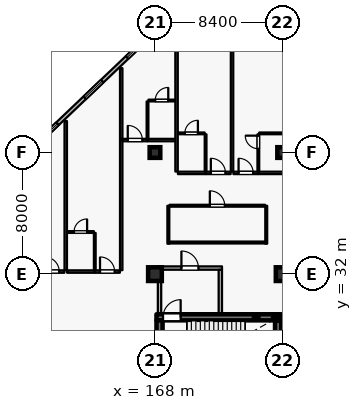
"""IFC4 building model, lengths in metres.
Left out: names, types, materials, properties, quantities, classifications, styles, units other than length and angle.
Written with IfcOpenShell. Run it as: python <this file> out.ifc"""

import sys

from ifc_helpers import new_model, si_unit, direction, frame, frame_2d, origin, origin_2d, place, context, subcontext, project, spatial, rectangle, hollow_rectangle, extrude, element, fill, save


model = new_model("IFC4")
c1 = context("Model", 3, precision=1e-05, world=origin(), true_north=direction((0.0, 1.0)))
c2 = subcontext(c1, "Body", "Model", "MODEL_VIEW")
j1 = project(units=[si_unit("LENGTHUNIT", "METRE"), si_unit("PLANEANGLEUNIT", "RADIAN")], contexts=[c1])
p1 = place(None, origin())
s1 = spatial("IfcSite", under=j1, at=p1, CompositionType="ELEMENT")
p2 = place(p1, origin())
s2 = spatial("IfcBuilding", under=s1, at=p2, CompositionType="ELEMENT")
p3 = place(p2, frame((0.0, 0.0, 11.4)))
s3 = spatial("IfcBuildingStorey", under=s2, at=p3, CompositionType="ELEMENT", Elevation=11.4)
for number, where, z_axis, x_axis in (
    (1, (168.0, 32.0, 0.0), (0.0, 0.0, 1.0), (1.0, 0.0, 0.0)),
    (2, (176.4, 32.0, 0.0), (0.0, 0.0, 1.0), (1.0, 0.0, 0.0)),
):
    element("IfcColumn", number, at=place(p3, frame(where, z_axis=z_axis, x_axis=x_axis)), inside=s3, PredefinedType="COLUMN", context=c2, shape_type="SweptSolid", body=[
        extrude(rectangle(XDim=0.9, YDim=0.9, at=origin_2d()), origin(), (0.0, 0.0, 1.0), 4.8),
    ])
for number, where, z_axis, x_axis in (
    (3, (168.0, 40.0, 0.0), (0.0, 0.0, 1.0), (1.0, 0.0, 0.0)),
    (4, (176.4, 40.0, 0.0), (0.0, 0.0, 1.0), (1.0, 0.0, 0.0)),
):
    element("IfcColumn", number, at=place(p3, frame(where, z_axis=z_axis, x_axis=x_axis)), inside=s3, PredefinedType="COLUMN", context=c2, shape_type="SweptSolid", body=[
        extrude(rectangle(XDim=0.7, YDim=0.7, at=origin_2d()), origin(), (0.0, 0.0, 1.0), 4.8),
    ])
p4 = place(p3, frame((160.0, 40.381, 0.0), z_axis=(0.0, 0.0, 1.0), x_axis=(0.724156739794, 0.689635422677, 0.0)))
e5 = element("IfcWall", 5, at=p4, inside=s3, PredefinedType="SOLIDWALL", context=c2, shape_type="SweptSolid", body=[
    extrude(rectangle(XDim=10.495, YDim=0.24, at=frame_2d((5.248, 0.0))), origin(), (0.0, 0.0, 1.0), 4.13),
])
p5 = place(p4, frame((0.602, 0.0, 0.8)))
e6 = element("IfcOpeningElement", 6, at=p5, cuts=e5, PredefinedType="OPENING", context=c2, shape_type="SweptSolid", body=[
    extrude(rectangle(XDim=1.6, YDim=1.6, at=frame_2d((0.8, 0.8))), frame((0.0, 0.13, 0.0), z_axis=(0.0, -1.0, 0.0), x_axis=(1.0, 0.0, 0.0)), (0.0, 0.0, 1.0), 0.26),
])
p6 = place(p4, frame((4.662, 0.0, 0.8)))
e7 = element("IfcOpeningElement", 7, at=p6, cuts=e5, PredefinedType="OPENING", context=c2, shape_type="SweptSolid", body=[
    extrude(rectangle(XDim=1.6, YDim=1.6, at=frame_2d((0.8, 0.8))), frame((0.0, 0.13, 0.0), z_axis=(0.0, -1.0, 0.0), x_axis=(1.0, 0.0, 0.0)), (0.0, 0.0, 1.0), 0.26),
])
p7 = place(p4, frame((8.508, 0.0, 0.8)))
e8 = element("IfcOpeningElement", 8, at=p7, cuts=e5, PredefinedType="OPENING", context=c2, shape_type="SweptSolid", body=[
    extrude(rectangle(XDim=1.6, YDim=1.6, at=frame_2d((0.8, 0.8))), frame((0.0, 0.13, 0.0), z_axis=(0.0, -1.0, 0.0), x_axis=(1.0, 0.0, 0.0)), (0.0, 0.0, 1.0), 0.26),
])
p8 = place(p3, frame((176.1, 25.005, 0.0), z_axis=(0.0, 0.0, 1.0), x_axis=(0.0, 1.0, 0.0)))
e9 = element("IfcWall", 9, at=p8, inside=s3, PredefinedType="SHEAR", context=c2, shape_type="SweptSolid", body=[
    extrude(rectangle(XDim=3.95, YDim=0.4, at=frame_2d((1.975, 0.0))), origin(), (0.0, 0.0, 1.0), 4.535),
])
p9 = place(p3, frame((168.1, 29.16, 0.0), z_axis=(0.0, 0.0, 1.0), x_axis=(1.0, 0.0, 0.0)))
e10 = element("IfcWall", 10, at=p9, inside=s3, PredefinedType="SHEAR", context=c2, shape_type="SweptSolid", body=[
    extrude(rectangle(XDim=8.2, YDim=0.4, at=frame_2d((4.1, 0.0))), origin(), (0.0, 0.0, 1.0), 4.535),
])
p10 = place(p9, frame((0.43, 0.0, 0.0)))
e11 = element("IfcOpeningElement", 11, at=p10, cuts=e10, PredefinedType="OPENING", context=c2, shape_type="SweptSolid", body=[
    extrude(rectangle(XDim=1.16, YDim=2.2, at=frame_2d((0.58, 1.1))), frame((0.0, 0.21, 0.0), z_axis=(0.0, -1.0, 0.0), x_axis=(1.0, 0.0, 0.0)), (0.0, 0.0, 1.0), 0.42),
])
p11 = place(p3, frame((168.3, 25.005, 0.0), z_axis=(0.0, 0.0, 1.0), x_axis=(0.0, 1.0, 0.0)))
e12 = element("IfcWall", 12, at=p11, inside=s3, PredefinedType="SHEAR", context=c2, shape_type="SweptSolid", body=[
    extrude(rectangle(XDim=3.95, YDim=0.4, at=frame_2d((1.975, 0.0))), origin(), (0.0, 0.0, 1.0), 4.535),
])
p12 = place(p3, frame((168.3, 29.365, 0.0), z_axis=(0.0, 0.0, 1.0), x_axis=(0.0, 1.0, 0.0)))
e13 = element("IfcWall", 13, at=p12, inside=s3, PredefinedType="PARTITIONING", context=c2, shape_type="SweptSolid", body=[
    extrude(rectangle(XDim=2.92, YDim=0.22, at=frame_2d((1.46, 0.0))), origin(), (0.0, 0.0, 1.0), 4.535),
])
p13 = place(p3, frame((168.19, 32.4, 0.0), z_axis=(0.0, 0.0, 1.0), x_axis=(1.0, 0.0, 0.0)))
e14 = element("IfcWall", 14, at=p13, inside=s3, PredefinedType="PARTITIONING", context=c2, shape_type="SweptSolid", body=[
    extrude(rectangle(XDim=4.22, YDim=0.22, at=frame_2d((2.11, 0.0))), origin(), (0.0, 0.0, 1.0), 4.535),
])
p14 = place(p13, frame((1.55, 0.0, 0.0)))
e15 = element("IfcOpeningElement", 15, at=p14, cuts=e14, PredefinedType="OPENING", context=c2, shape_type="SweptSolid", body=[
    extrude(rectangle(XDim=1.12, YDim=2.2, at=frame_2d((0.56, 1.1))), frame((0.0, 0.12, 0.0), z_axis=(0.0, -1.0, 0.0), x_axis=(1.0, 0.0, 0.0)), (0.0, 0.0, 1.0), 0.24),
])
p15 = place(p3, frame((172.3, 29.365, 0.0), z_axis=(0.0, 0.0, 1.0), x_axis=(0.0, 1.0, 0.0)))
e16 = element("IfcWall", 16, at=p15, inside=s3, PredefinedType="PARTITIONING", context=c2, shape_type="SweptSolid", body=[
    extrude(rectangle(XDim=2.92, YDim=0.22, at=frame_2d((1.46, 0.0))), origin(), (0.0, 0.0, 1.0), 4.535),
])
for number, where, z_axis, x_axis in (
    (17, (174.66, 29.16, -2.7), (0.0, 0.0, 1.0), (1.0, 0.0, 0.0)),
    (18, (175.92, 29.16, -2.7), (0.0, 0.0, 1.0), (1.0, 0.0, 0.0)),
):
    element("IfcColumn", number, at=place(p3, frame(where, z_axis=z_axis, x_axis=x_axis)), inside=s3, PredefinedType="COLUMN", context=c2, shape_type="SweptSolid", body=[
        extrude(hollow_rectangle(XDim=0.3, YDim=0.3, WallThickness=0.012, at=origin_2d()), origin(), (0.0, 0.0, 1.0), 4.92),
    ])
p16 = place(p3, frame((160.4, 32.17, 0.0), z_axis=(0.0, 0.0, 1.0), x_axis=(1.0, 0.0, 0.0)))
e19 = element("IfcWall", 19, at=p16, inside=s3, PredefinedType="PARTITIONING", context=c2, shape_type="SweptSolid", body=[
    extrude(rectangle(XDim=1.64, YDim=0.16, at=frame_2d((0.82, 0.0))), origin(), (0.0, 0.0, 1.0), 4.535),
])
p17 = place(p16, frame((0.34, 0.0, 0.0)))
e20 = element("IfcOpeningElement", 20, at=p17, cuts=e19, PredefinedType="OPENING", context=c2, shape_type="SweptSolid", body=[
    extrude(rectangle(XDim=0.96, YDim=2.2, at=frame_2d((0.48, 1.1))), frame((0.0, 0.09, 0.0), z_axis=(0.0, -1.0, 0.0), x_axis=(1.0, 0.0, 0.0)), (0.0, 0.0, 1.0), 0.18),
])
p18 = place(p3, frame((162.22, 32.17, 0.0), z_axis=(0.0, 0.0, 1.0), x_axis=(1.0, 0.0, 0.0)))
e21 = element("IfcWall", 21, at=p18, inside=s3, PredefinedType="PARTITIONING", context=c2, shape_type="SweptSolid", body=[
    extrude(rectangle(XDim=1.81, YDim=0.16, at=frame_2d((0.905, 0.0))), origin(), (0.0, 0.0, 1.0), 4.535),
])
p19 = place(p3, frame((164.04, 32.17, 0.0), z_axis=(0.0, 0.0, 1.0), x_axis=(1.0, 0.0, 0.0)))
e22 = element("IfcWall", 22, at=p19, inside=s3, PredefinedType="PARTITIONING", context=c2, shape_type="SweptSolid", body=[
    extrude(rectangle(XDim=1.65, YDim=0.16, at=frame_2d((0.825, 0.0))), origin(), (0.0, 0.0, 1.0), 4.535),
])
p20 = place(p19, frame((0.345, 0.0, 0.0)))
e23 = element("IfcOpeningElement", 23, at=p20, cuts=e22, PredefinedType="OPENING", context=c2, shape_type="SweptSolid", body=[
    extrude(rectangle(XDim=0.96, YDim=2.2, at=frame_2d((0.48, 1.1))), frame((0.0, 0.09, 0.0), z_axis=(0.0, -1.0, 0.0), x_axis=(1.0, 0.0, 0.0)), (0.0, 0.0, 1.0), 0.18),
])
p21 = place(p3, frame((164.04, 32.26, 0.0), z_axis=(0.0, 0.0, 1.0), x_axis=(0.0, 1.0, 0.0)))
e24 = element("IfcWall", 24, at=p21, inside=s3, PredefinedType="PARTITIONING", context=c2, shape_type="SweptSolid", body=[
    extrude(rectangle(XDim=2.45, YDim=0.115, at=frame_2d((1.225, 0.0))), origin(), (0.0, 0.0, 1.0), 4.535),
])
p22 = place(p3, frame((162.23, 34.77, 0.0), z_axis=(0.0, 0.0, 1.0), x_axis=(1.0, 0.0, 0.0)))
e25 = element("IfcWall", 25, at=p22, inside=s3, PredefinedType="PARTITIONING", context=c2, shape_type="SweptSolid", body=[
    extrude(rectangle(XDim=1.75, YDim=0.115, at=frame_2d((0.875, 0.0))), origin(), (0.0, 0.0, 1.0), 4.535),
])
p23 = place(p22, frame((0.445, 0.0, 0.0)))
e26 = element("IfcOpeningElement", 26, at=p23, cuts=e25, PredefinedType="OPENING", context=c2, shape_type="SweptSolid", body=[
    extrude(rectangle(XDim=0.86, YDim=2.12, at=frame_2d((0.43, 1.06))), frame((0.0, 0.067, 0.0), z_axis=(0.0, -1.0, 0.0), x_axis=(1.0, 0.0, 0.0)), (0.0, 0.0, 1.0), 0.135),
])
p24 = place(p3, frame((162.13, 32.26, 0.0), z_axis=(0.0, 0.0, 1.0), x_axis=(0.0, 1.0, 0.0)))
e27 = element("IfcWall", 27, at=p24, inside=s3, PredefinedType="PARTITIONING", context=c2, shape_type="SweptSolid", body=[
    extrude(rectangle(XDim=9.81, YDim=0.16, at=frame_2d((4.905, 0.0))), origin(), (0.0, 0.0, 1.0), 4.535),
])
p25 = place(p3, frame((165.78, 32.26, 0.0), z_axis=(0.0, 0.0, 1.0), x_axis=(0.0, 1.0, 0.0)))
e28 = element("IfcWall", 28, at=p25, inside=s3, PredefinedType="PARTITIONING", context=c2, shape_type="SweptSolid", body=[
    extrude(rectangle(XDim=8.64, YDim=0.16, at=frame_2d((4.32, 0.0))), origin(), (0.0, 0.0, 1.0), 4.535),
])
p26 = place(p3, frame((165.87, 40.82, 0.0), z_axis=(0.0, 0.0, 1.0), x_axis=(1.0, 0.0, 0.0)))
e29 = element("IfcWall", 29, at=p26, inside=s3, PredefinedType="PARTITIONING", context=c2, shape_type="SweptSolid", body=[
    extrude(rectangle(XDim=1.64, YDim=0.16, at=frame_2d((0.82, 0.0))), origin(), (0.0, 0.0, 1.0), 4.535),
])
p27 = place(p26, frame((0.34, 0.0, 0.0)))
e30 = element("IfcOpeningElement", 30, at=p27, cuts=e29, PredefinedType="OPENING", context=c2, shape_type="SweptSolid", body=[
    extrude(rectangle(XDim=0.96, YDim=2.2, at=frame_2d((0.48, 1.1))), frame((0.0, 0.09, 0.0), z_axis=(0.0, -1.0, 0.0), x_axis=(1.0, 0.0, 0.0)), (0.0, 0.0, 1.0), 0.18),
])
p28 = place(p3, frame((167.52, 40.82, 0.0), z_axis=(0.0, 0.0, 1.0), x_axis=(1.0, 0.0, 0.0)))
e31 = element("IfcWall", 31, at=p28, inside=s3, PredefinedType="PARTITIONING", context=c2, shape_type="SweptSolid", body=[
    extrude(rectangle(XDim=1.81, YDim=0.16, at=frame_2d((0.905, 0.0))), origin(), (0.0, 0.0, 1.0), 4.535),
])
p29 = place(p3, frame((167.51, 40.91, 0.0), z_axis=(0.0, 0.0, 1.0), x_axis=(0.0, 1.0, 0.0)))
e32 = element("IfcWall", 32, at=p29, inside=s3, PredefinedType="PARTITIONING", context=c2, shape_type="SweptSolid", body=[
    extrude(rectangle(XDim=2.45, YDim=0.115, at=frame_2d((1.225, 0.0))), origin(), (0.0, 0.0, 1.0), 4.535),
])
p30 = place(p3, frame((167.57, 43.42, 0.0), z_axis=(0.0, 0.0, 1.0), x_axis=(1.0, 0.0, 0.0)))
e33 = element("IfcWall", 33, at=p30, inside=s3, PredefinedType="PARTITIONING", context=c2, shape_type="SweptSolid", body=[
    extrude(rectangle(XDim=1.75, YDim=0.115, at=frame_2d((0.875, 0.0))), origin(), (0.0, 0.0, 1.0), 4.535),
])
p31 = place(p30, frame((0.445, 0.0, 0.0)))
e34 = element("IfcOpeningElement", 34, at=p31, cuts=e33, PredefinedType="OPENING", context=c2, shape_type="SweptSolid", body=[
    extrude(rectangle(XDim=0.86, YDim=2.12, at=frame_2d((0.43, 1.06))), frame((0.0, 0.067, 0.0), z_axis=(0.0, -1.0, 0.0), x_axis=(1.0, 0.0, 0.0)), (0.0, 0.0, 1.0), 0.135),
])
p32 = place(p3, frame((165.78, 40.91, 0.0), z_axis=(0.0, 0.0, 1.0), x_axis=(0.0, 1.0, 0.0)))
e35 = element("IfcWall", 35, at=p32, inside=s3, PredefinedType="PARTITIONING", context=c2, shape_type="SweptSolid", body=[
    extrude(rectangle(XDim=4.64, YDim=0.16, at=frame_2d((2.32, 0.0))), origin(), (0.0, 0.0, 1.0), 4.535),
])
p33 = place(p3, frame((169.51, 38.66, 0.0), z_axis=(0.0, 0.0, 1.0), x_axis=(1.0, 0.0, 0.0)))
e36 = element("IfcWall", 36, at=p33, inside=s3, PredefinedType="PARTITIONING", context=c2, shape_type="SweptSolid", body=[
    extrude(rectangle(XDim=1.81, YDim=0.16, at=frame_2d((0.905, 0.0))), origin(), (0.0, 0.0, 1.0), 4.535),
])
p34 = place(p3, frame((171.33, 38.66, 0.0), z_axis=(0.0, 0.0, 1.0), x_axis=(1.0, 0.0, 0.0)))
e37 = element("IfcWall", 37, at=p34, inside=s3, PredefinedType="PARTITIONING", context=c2, shape_type="SweptSolid", body=[
    extrude(rectangle(XDim=1.65, YDim=0.16, at=frame_2d((0.825, 0.0))), origin(), (0.0, 0.0, 1.0), 4.535),
])
p35 = place(p34, frame((0.345, 0.0, 0.0)))
e38 = element("IfcOpeningElement", 38, at=p35, cuts=e37, PredefinedType="OPENING", context=c2, shape_type="SweptSolid", body=[
    extrude(rectangle(XDim=0.96, YDim=2.2, at=frame_2d((0.48, 1.1))), frame((0.0, 0.09, 0.0), z_axis=(0.0, -1.0, 0.0), x_axis=(1.0, 0.0, 0.0)), (0.0, 0.0, 1.0), 0.18),
])
p36 = place(p3, frame((171.33, 38.75, 0.0), z_axis=(0.0, 0.0, 1.0), x_axis=(0.0, 1.0, 0.0)))
e39 = element("IfcWall", 39, at=p36, inside=s3, PredefinedType="PARTITIONING", context=c2, shape_type="SweptSolid", body=[
    extrude(rectangle(XDim=2.45, YDim=0.115, at=frame_2d((1.225, 0.0))), origin(), (0.0, 0.0, 1.0), 4.535),
])
p37 = place(p3, frame((169.52, 41.26, 0.0), z_axis=(0.0, 0.0, 1.0), x_axis=(1.0, 0.0, 0.0)))
e40 = element("IfcWall", 40, at=p37, inside=s3, PredefinedType="PARTITIONING", context=c2, shape_type="SweptSolid", body=[
    extrude(rectangle(XDim=1.75, YDim=0.115, at=frame_2d((0.875, 0.0))), origin(), (0.0, 0.0, 1.0), 4.535),
])
p38 = place(p37, frame((0.445, 0.0, 0.0)))
e41 = element("IfcOpeningElement", 41, at=p38, cuts=e40, PredefinedType="OPENING", context=c2, shape_type="SweptSolid", body=[
    extrude(rectangle(XDim=0.86, YDim=2.12, at=frame_2d((0.43, 1.06))), frame((0.0, 0.067, 0.0), z_axis=(0.0, -1.0, 0.0), x_axis=(1.0, 0.0, 0.0)), (0.0, 0.0, 1.0), 0.135),
])
p39 = place(p3, frame((169.42, 38.75, 0.0), z_axis=(0.0, 0.0, 1.0), x_axis=(0.0, 1.0, 0.0)))
e42 = element("IfcWall", 42, at=p39, inside=s3, PredefinedType="PARTITIONING", context=c2, shape_type="SweptSolid", body=[
    extrude(rectangle(XDim=8.91, YDim=0.16, at=frame_2d((4.455, 0.0))), origin(), (0.0, 0.0, 1.0), 4.535),
])
p40 = place(p3, frame((173.16, 38.66, 0.0), z_axis=(0.0, 0.0, 1.0), x_axis=(1.0, 0.0, 0.0)))
e43 = element("IfcWall", 43, at=p40, inside=s3, PredefinedType="PARTITIONING", context=c2, shape_type="SweptSolid", body=[
    extrude(rectangle(XDim=1.64, YDim=0.16, at=frame_2d((0.82, 0.0))), origin(), (0.0, 0.0, 1.0), 4.535),
])
p41 = place(p40, frame((0.34, 0.0, 0.0)))
e44 = element("IfcOpeningElement", 44, at=p41, cuts=e43, PredefinedType="OPENING", context=c2, shape_type="SweptSolid", body=[
    extrude(rectangle(XDim=0.96, YDim=2.2, at=frame_2d((0.48, 1.1))), frame((0.0, 0.09, 0.0), z_axis=(0.0, -1.0, 0.0), x_axis=(1.0, 0.0, 0.0)), (0.0, 0.0, 1.0), 0.18),
])
p42 = place(p3, frame((174.81, 38.66, 0.0), z_axis=(0.0, 0.0, 1.0), x_axis=(1.0, 0.0, 0.0)))
e45 = element("IfcWall", 45, at=p42, inside=s3, PredefinedType="PARTITIONING", context=c2, shape_type="SweptSolid", body=[
    extrude(rectangle(XDim=1.81, YDim=0.16, at=frame_2d((0.905, 0.0))), origin(), (0.0, 0.0, 1.0), 4.535),
])
p43 = place(p3, frame((174.8, 38.75, 0.0), z_axis=(0.0, 0.0, 1.0), x_axis=(0.0, 1.0, 0.0)))
e46 = element("IfcWall", 46, at=p43, inside=s3, PredefinedType="PARTITIONING", context=c2, shape_type="SweptSolid", body=[
    extrude(rectangle(XDim=2.45, YDim=0.115, at=frame_2d((1.225, 0.0))), origin(), (0.0, 0.0, 1.0), 4.535),
])
p44 = place(p43, frame((1.5, 0.0, 0.0)))
e47 = element("IfcOpeningElement", 47, at=p44, cuts=e46, PredefinedType="OPENING", context=c2, shape_type="SweptSolid", body=[
    extrude(rectangle(XDim=0.86, YDim=2.12, at=frame_2d((0.43, 1.06))), frame((0.0, 0.067, 0.0), z_axis=(0.0, -1.0, 0.0), x_axis=(1.0, 0.0, 0.0)), (0.0, 0.0, 1.0), 0.135),
])
p45 = place(p3, frame((174.86, 41.26, 0.0), z_axis=(0.0, 0.0, 1.0), x_axis=(1.0, 0.0, 0.0)))
e48 = element("IfcWall", 48, at=p45, inside=s3, PredefinedType="PARTITIONING", context=c2, shape_type="SweptSolid", body=[
    extrude(rectangle(XDim=1.75, YDim=0.115, at=frame_2d((0.875, 0.0))), origin(), (0.0, 0.0, 1.0), 4.535),
])
p46 = place(p3, frame((173.07, 38.75, 0.0), z_axis=(0.0, 0.0, 1.0), x_axis=(0.0, 1.0, 0.0)))
e49 = element("IfcWall", 49, at=p46, inside=s3, PredefinedType="PARTITIONING", context=c2, shape_type="SweptSolid", body=[
    extrude(rectangle(XDim=8.91, YDim=0.16, at=frame_2d((4.455, 0.0))), origin(), (0.0, 0.0, 1.0), 4.535),
])
p47 = place(p3, frame((168.96, 36.5, 0.0), z_axis=(0.0, 0.0, 1.0), x_axis=(1.0, 0.0, 0.0)))
e50 = element("IfcWall", 50, at=p47, inside=s3, PredefinedType="PARTITIONING", context=c2, shape_type="SweptSolid", body=[
    extrude(rectangle(XDim=6.28, YDim=0.125, at=frame_2d((3.14, 0.0))), origin(), (0.0, 0.0, 1.0), 4.535),
])
p48 = place(p47, frame((2.65, 0.0, 0.0)))
e51 = element("IfcOpeningElement", 51, at=p48, cuts=e50, PredefinedType="OPENING", context=c2, shape_type="SweptSolid", body=[
    extrude(rectangle(XDim=0.98, YDim=2.15, at=frame_2d((0.49, 1.075))), frame((0.0, 0.073, 0.0), z_axis=(0.0, -1.0, 0.0), x_axis=(1.0, 0.0, 0.0)), (0.0, 0.0, 1.0), 0.145),
])
for number, where, z_axis, x_axis in (
    (52, (168.88, 34.0, 0.0), (0.0, 0.0, 1.0), (0.0, 1.0, 0.0)),
    (53, (175.32, 34.0, 0.0), (0.0, 0.0, 1.0), (0.0, 1.0, 0.0)),
):
    element("IfcWall", number, at=place(p3, frame(where, z_axis=z_axis, x_axis=x_axis)), inside=s3, PredefinedType="PARTITIONING", context=c2, shape_type="SweptSolid", body=[
        extrude(rectangle(XDim=2.496, YDim=0.125, at=frame_2d((1.248, 0.0))), origin(), (0.0, 0.0, 1.0), 4.535),
    ])
p49 = place(p3, frame((168.943, 34.08, 0.0), z_axis=(0.0, 0.0, 1.0), x_axis=(1.0, 0.0, 0.0)))
e54 = element("IfcWall", 54, at=p49, inside=s3, PredefinedType="PARTITIONING", context=c2, shape_type="SweptSolid", body=[
    extrude(rectangle(XDim=6.314, YDim=0.125, at=frame_2d((3.157, 0.0))), origin(), (0.0, 0.0, 1.0), 4.535),
])
p50 = place(p5, origin())
e55 = element("IfcWindow", 55, at=p50, inside=s3, PartitioningType="SINGLE_PANEL", PredefinedType="WINDOW", context=c2, shape_type="SweptSolid", body=[
    extrude(rectangle(XDim=1.6, YDim=1.6, at=frame_2d((0.8, 0.8))), frame((0.0, 0.03, 0.0), z_axis=(0.0, -1.0, 0.0), x_axis=(1.0, 0.0, 0.0)), (0.0, 0.0, 1.0), 0.06),
])
fill(e6, e55)
p51 = place(p6, origin())
e56 = element("IfcWindow", 56, at=p51, inside=s3, PartitioningType="SINGLE_PANEL", PredefinedType="WINDOW", context=c2, shape_type="SweptSolid", body=[
    extrude(rectangle(XDim=1.6, YDim=1.6, at=frame_2d((0.8, 0.8))), frame((0.0, 0.03, 0.0), z_axis=(0.0, -1.0, 0.0), x_axis=(1.0, 0.0, 0.0)), (0.0, 0.0, 1.0), 0.06),
])
fill(e7, e56)
p52 = place(p7, origin())
e57 = element("IfcWindow", 57, at=p52, inside=s3, PartitioningType="SINGLE_PANEL", PredefinedType="WINDOW", context=c2, shape_type="SweptSolid", body=[
    extrude(rectangle(XDim=1.6, YDim=1.6, at=frame_2d((0.8, 0.8))), frame((0.0, 0.03, 0.0), z_axis=(0.0, -1.0, 0.0), x_axis=(1.0, 0.0, 0.0)), (0.0, 0.0, 1.0), 0.06),
])
fill(e8, e57)
p53 = place(p10, origin())
e58 = element("IfcDoor", 58, at=p53, inside=s3, OperationType="SINGLE_SWING_RIGHT", PredefinedType="DOOR", context=c2, shape_type="SweptSolid", body=[
    extrude(rectangle(XDim=1.16, YDim=2.2, at=frame_2d((0.58, 1.1))), frame((0.0, 0.025, 0.0), z_axis=(0.0, -1.0, 0.0), x_axis=(1.0, 0.0, 0.0)), (0.0, 0.0, 1.0), 0.05),
])
fill(e11, e58)
p54 = place(p14, origin())
e59 = element("IfcDoor", 59, at=p54, inside=s3, OperationType="SINGLE_SWING_LEFT", PredefinedType="DOOR", context=c2, shape_type="SweptSolid", body=[
    extrude(rectangle(XDim=1.12, YDim=2.2, at=frame_2d((0.56, 1.1))), frame((0.0, 0.025, 0.0), z_axis=(0.0, -1.0, 0.0), x_axis=(1.0, 0.0, 0.0)), (0.0, 0.0, 1.0), 0.05),
])
fill(e15, e59)
p55 = place(p17, origin())
e60 = element("IfcDoor", 60, at=p55, inside=s3, OperationType="SINGLE_SWING_LEFT", PredefinedType="DOOR", context=c2, shape_type="SweptSolid", body=[
    extrude(rectangle(XDim=0.96, YDim=2.2, at=frame_2d((0.48, 1.1))), frame((0.0, 0.025, 0.0), z_axis=(0.0, -1.0, 0.0), x_axis=(1.0, 0.0, 0.0)), (0.0, 0.0, 1.0), 0.05),
])
fill(e20, e60)
p56 = place(p20, origin())
e61 = element("IfcDoor", 61, at=p56, inside=s3, OperationType="SINGLE_SWING_LEFT", PredefinedType="DOOR", context=c2, shape_type="SweptSolid", body=[
    extrude(rectangle(XDim=0.96, YDim=2.2, at=frame_2d((0.48, 1.1))), frame((0.0, 0.025, 0.0), z_axis=(0.0, -1.0, 0.0), x_axis=(1.0, 0.0, 0.0)), (0.0, 0.0, 1.0), 0.05),
])
fill(e23, e61)
p57 = place(p23, origin())
e62 = element("IfcDoor", 62, at=p57, inside=s3, OperationType="SINGLE_SWING_RIGHT", PredefinedType="DOOR", context=c2, shape_type="SweptSolid", body=[
    extrude(rectangle(XDim=0.86, YDim=2.12, at=frame_2d((0.43, 1.06))), frame((0.0, 0.025, 0.0), z_axis=(0.0, -1.0, 0.0), x_axis=(1.0, 0.0, 0.0)), (0.0, 0.0, 1.0), 0.05),
])
fill(e26, e62)
p58 = place(p27, origin())
e63 = element("IfcDoor", 63, at=p58, inside=s3, OperationType="SINGLE_SWING_LEFT", PredefinedType="DOOR", context=c2, shape_type="SweptSolid", body=[
    extrude(rectangle(XDim=0.96, YDim=2.2, at=frame_2d((0.48, 1.1))), frame((0.0, 0.025, 0.0), z_axis=(0.0, -1.0, 0.0), x_axis=(1.0, 0.0, 0.0)), (0.0, 0.0, 1.0), 0.05),
])
fill(e30, e63)
p59 = place(p31, origin())
e64 = element("IfcDoor", 64, at=p59, inside=s3, OperationType="SINGLE_SWING_RIGHT", PredefinedType="DOOR", context=c2, shape_type="SweptSolid", body=[
    extrude(rectangle(XDim=0.86, YDim=2.12, at=frame_2d((0.43, 1.06))), frame((0.0, 0.025, 0.0), z_axis=(0.0, -1.0, 0.0), x_axis=(1.0, 0.0, 0.0)), (0.0, 0.0, 1.0), 0.05),
])
fill(e34, e64)
p60 = place(p35, origin())
e65 = element("IfcDoor", 65, at=p60, inside=s3, OperationType="SINGLE_SWING_LEFT", PredefinedType="DOOR", context=c2, shape_type="SweptSolid", body=[
    extrude(rectangle(XDim=0.96, YDim=2.2, at=frame_2d((0.48, 1.1))), frame((0.0, 0.025, 0.0), z_axis=(0.0, -1.0, 0.0), x_axis=(1.0, 0.0, 0.0)), (0.0, 0.0, 1.0), 0.05),
])
fill(e38, e65)
p61 = place(p38, origin())
e66 = element("IfcDoor", 66, at=p61, inside=s3, OperationType="SINGLE_SWING_RIGHT", PredefinedType="DOOR", context=c2, shape_type="SweptSolid", body=[
    extrude(rectangle(XDim=0.86, YDim=2.12, at=frame_2d((0.43, 1.06))), frame((0.0, 0.025, 0.0), z_axis=(0.0, -1.0, 0.0), x_axis=(1.0, 0.0, 0.0)), (0.0, 0.0, 1.0), 0.05),
])
fill(e41, e66)
p62 = place(p41, origin())
e67 = element("IfcDoor", 67, at=p62, inside=s3, OperationType="SINGLE_SWING_LEFT", PredefinedType="DOOR", context=c2, shape_type="SweptSolid", body=[
    extrude(rectangle(XDim=0.96, YDim=2.2, at=frame_2d((0.48, 1.1))), frame((0.0, 0.025, 0.0), z_axis=(0.0, -1.0, 0.0), x_axis=(1.0, 0.0, 0.0)), (0.0, 0.0, 1.0), 0.05),
])
fill(e44, e67)
p63 = place(p44, origin())
e68 = element("IfcDoor", 68, at=p63, inside=s3, OperationType="SINGLE_SWING_RIGHT", PredefinedType="DOOR", context=c2, shape_type="SweptSolid", body=[
    extrude(rectangle(XDim=0.86, YDim=2.12, at=frame_2d((0.43, 1.06))), frame((0.0, 0.025, 0.0), z_axis=(0.0, -1.0, 0.0), x_axis=(1.0, 0.0, 0.0)), (0.0, 0.0, 1.0), 0.05),
])
fill(e47, e68)
p64 = place(p48, origin())
e69 = element("IfcDoor", 69, at=p64, inside=s3, OperationType="SINGLE_SWING_LEFT", PredefinedType="DOOR", context=c2, shape_type="SweptSolid", body=[
    extrude(rectangle(XDim=0.98, YDim=2.15, at=frame_2d((0.49, 1.075))), frame((0.0, 0.025, 0.0), z_axis=(0.0, -1.0, 0.0), x_axis=(1.0, 0.0, 0.0)), (0.0, 0.0, 1.0), 0.05),
])
fill(e51, e69)
save(model, sys.argv[1])
